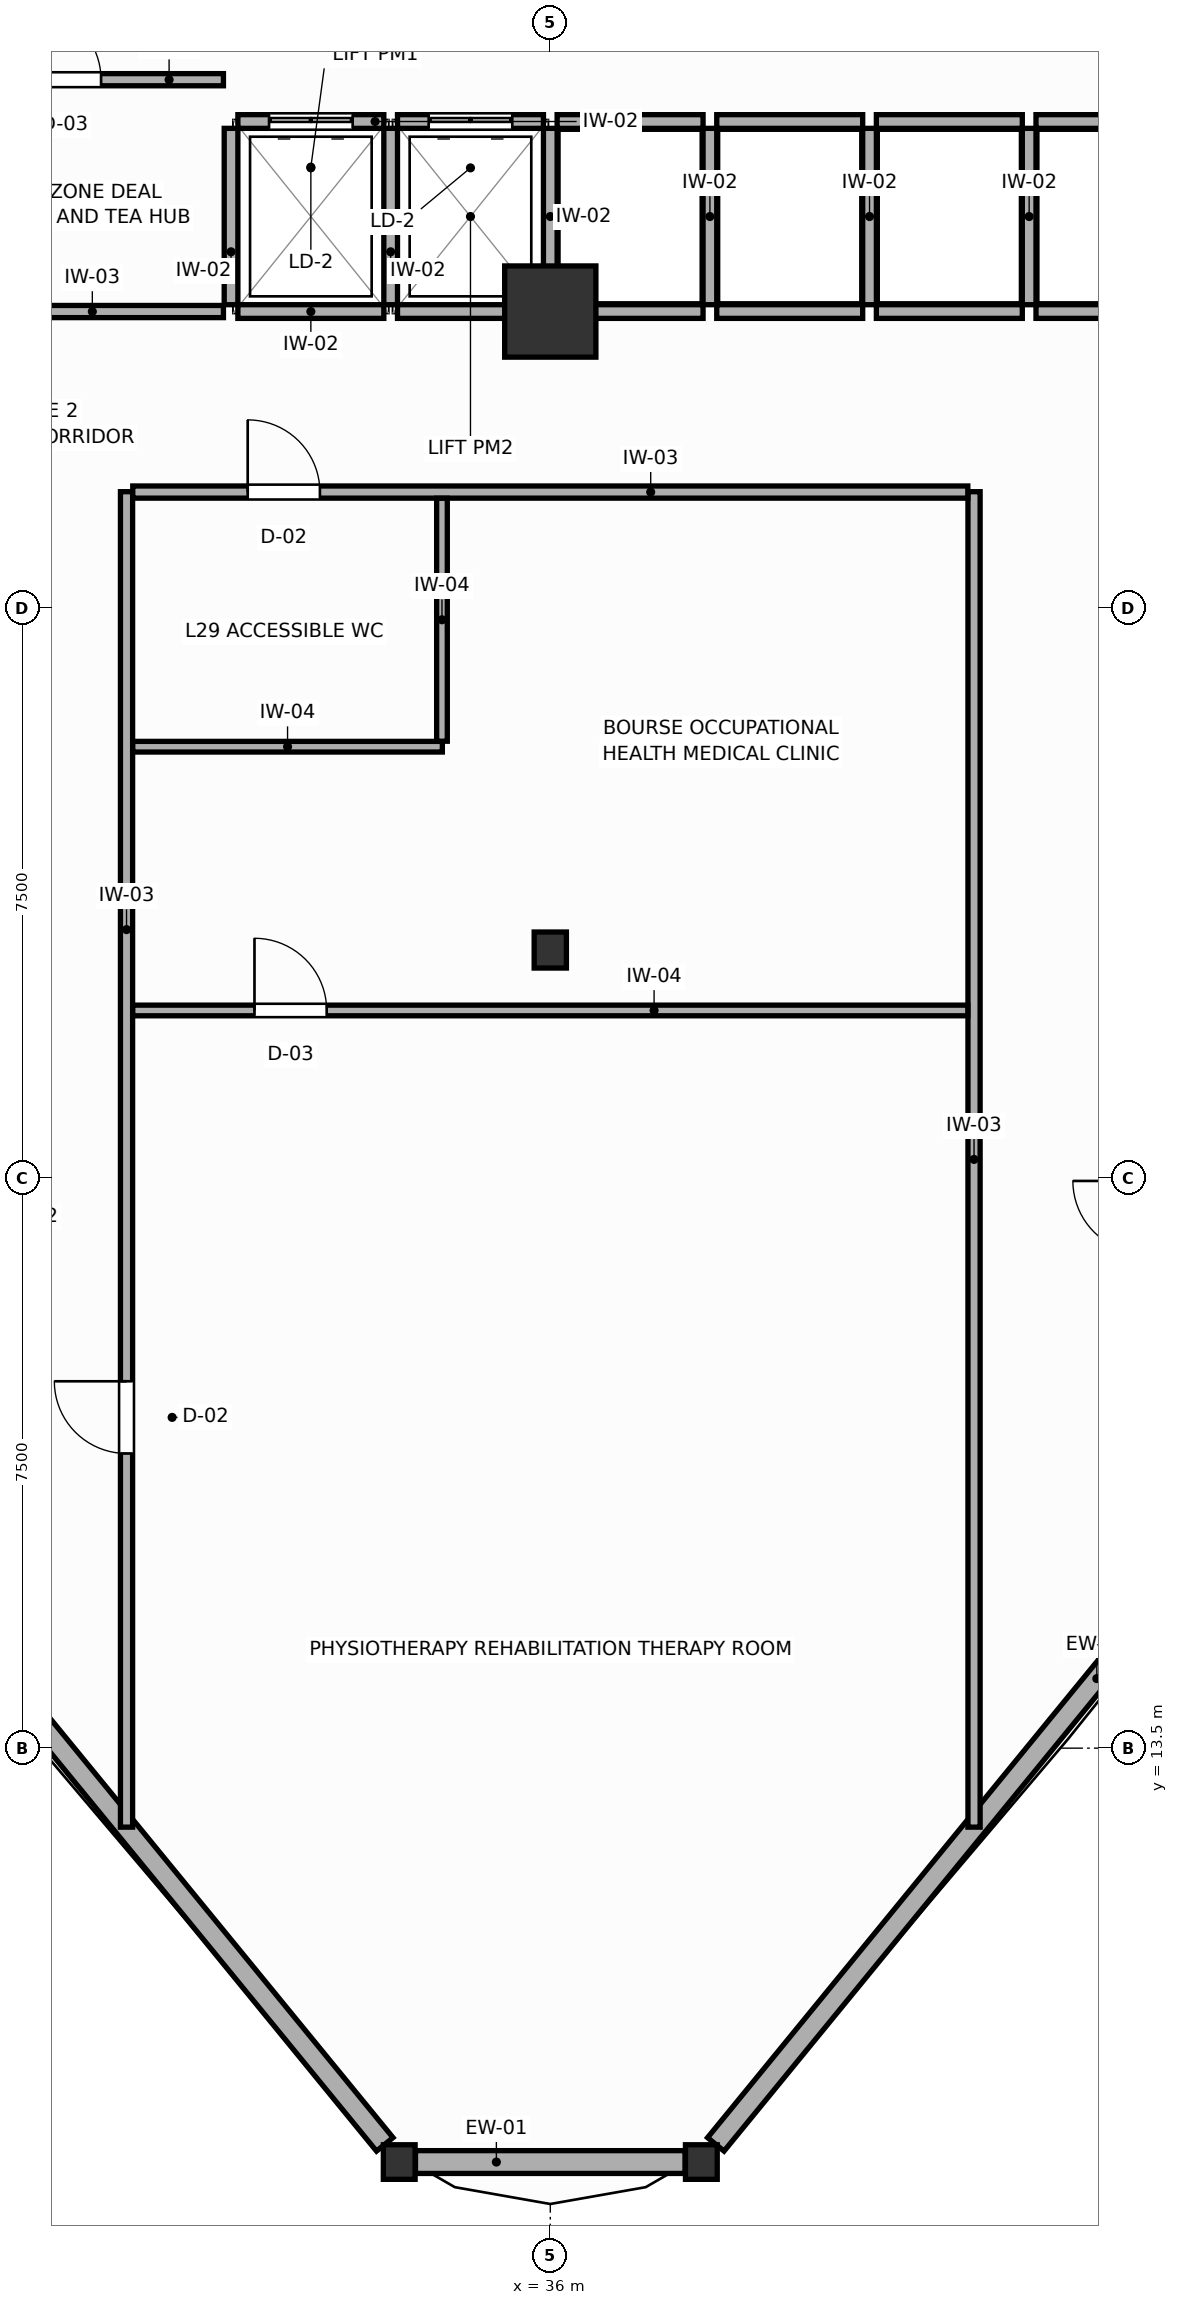
"""IFC4 building model, lengths in metres.
Left out: names, types, materials, properties, quantities, classifications, styles, units other than length and angle.
Written with IfcOpenShell. Run it as: python <this file> out.ifc"""

import sys

from ifc_helpers import new_model, si_unit, direction, frame, frame_2d, origin, origin_2d, place, context, subcontext, project, spatial, rectangle, i_section, extrude, source, transform, mapped, element, fill, save


model = new_model("IFC4")
c1 = context("Model", 3, precision=1e-05, world=origin(), true_north=direction((0.0, 1.0)))
c2 = subcontext(c1, "Body", "Model", "MODEL_VIEW")
j1 = project(units=[si_unit("LENGTHUNIT", "METRE"), si_unit("PLANEANGLEUNIT", "RADIAN")], contexts=[c1])
p1 = place(None, origin())
s1 = spatial("IfcSite", under=j1, at=p1, CompositionType="ELEMENT")
p2 = place(p1, origin())
s2 = spatial("IfcBuilding", under=s1, at=p2, CompositionType="ELEMENT")
p3 = place(p2, frame((0.0, 0.0, 117.0)))
s3 = spatial("IfcBuildingStorey", under=s2, at=p3, CompositionType="ELEMENT", Elevation=117.0)
m1 = source(origin(), c2, "Body", "SweptSolid", [
    extrude(rectangle(XDim=1.2, YDim=1.2, at=origin_2d()), origin(), (0.0, 0.0, 1.0), 3.6),
])
p4 = place(p3, frame((36.0, 32.4, 0.0), z_axis=(0.0, 0.0, 1.0), x_axis=(1.0, 0.0, 0.0)))
e1 = element("IfcColumn", 1, at=p4, inside=s3, PredefinedType="COLUMN", context=c2, shape_type="MappedRepresentation", body=[
    mapped(m1, transform((0.0, 0.0, 0.0), scale=1.0)),
])
m2 = source(origin(), c2, "Body", "SweptSolid", [
    extrude(i_section(OverallWidth=0.424, OverallDepth=0.474, WebThickness=0.045, FlangeThickness=0.072, FilletRadius=0.015, at=origin_2d()), origin(), (0.0, 0.0, 1.0), 3.6),
])
p5 = place(p3, frame((36.0, 24.0, 0.0), z_axis=(0.0, 0.0, 1.0), x_axis=(1.0, 0.0, 0.0)))
e2 = element("IfcColumn", 2, at=p5, inside=s3, PredefinedType="COLUMN", context=c2, shape_type="MappedRepresentation", body=[
    mapped(m2, transform((0.0, 0.0, 0.0), scale=1.0)),
])
m3 = source(origin(), c2, "Body", "SweptSolid", [
    extrude(i_section(OverallWidth=0.418, OverallDepth=0.455, WebThickness=0.039, FlangeThickness=0.063, FilletRadius=0.015, at=origin_2d()), origin(), (0.0, 0.0, 1.0), 3.6),
])
for number, where, z_axis, x_axis in (
    (3, (34.013, 8.055, 0.0), (0.0, 0.0, 1.0), (1.0, 0.0, 0.0)),
    (4, (37.987, 8.055, 0.0), (0.0, 0.0, 1.0), (1.0, 0.0, 0.0)),
):
    element("IfcColumn", number, at=place(p3, frame(where, z_axis=z_axis, x_axis=x_axis)), inside=s3, PredefinedType="COLUMN", context=c2, shape_type="MappedRepresentation", body=[
        mapped(m3, transform((0.0, 0.0, 0.0), scale=1.0)),
    ])
p6 = place(p3, frame((23.797, 20.543, 0.0), z_axis=(0.0, 0.0, 1.0), x_axis=(0.633140387555, -0.774036982092, 0.0)))
e5 = element("IfcWall", 5, at=p6, inside=s3, PredefinedType="SOLIDWALL", context=c2, shape_type="SweptSolid", body=[
    extrude(rectangle(XDim=15.834, YDim=0.28, at=frame_2d((7.917, 0.0))), origin(), (0.0, 0.0, 1.0), 1.87),
])
p7 = place(p3, frame((34.227, 8.055, 0.0), z_axis=(0.0, 0.0, 1.0), x_axis=(1.0, 0.0, 0.0)))
e6 = element("IfcWall", 6, at=p7, inside=s3, PredefinedType="SOLIDWALL", context=c2, shape_type="SweptSolid", body=[
    extrude(rectangle(XDim=3.547, YDim=0.3, at=frame_2d((1.773, 0.0))), origin(), (0.0, 0.0, 1.0), 1.87),
])
p8 = place(p3, frame((38.177, 8.287, 0.0), z_axis=(0.0, 0.0, 1.0), x_axis=(0.633140387555, 0.774036982092, 0.0)))
e7 = element("IfcWall", 7, at=p8, inside=s3, PredefinedType="SOLIDWALL", context=c2, shape_type="SweptSolid", body=[
    extrude(rectangle(XDim=15.834, YDim=0.28, at=frame_2d((7.917, 0.0))), origin(), (0.0, 0.0, 1.0), 1.87),
])
p9 = place(p3, frame((31.89, 34.9, 0.0), z_axis=(0.0, 0.0, 1.0), x_axis=(1.0, 0.0, 0.0)))
e8 = element("IfcWall", 8, at=p9, inside=s3, PredefinedType="PARTITIONING", context=c2, shape_type="SweptSolid", body=[
    extrude(rectangle(XDim=1.92, YDim=0.18, at=frame_2d((0.96, 0.0))), origin(), (0.0, 0.0, 1.0), 3.4),
])
p10 = place(p9, frame((0.41, 0.0, 0.0)))
e9 = element("IfcOpeningElement", 9, at=p10, cuts=e8, PredefinedType="OPENING", context=c2, shape_type="SweptSolid", body=[
    extrude(rectangle(XDim=1.1, YDim=2.1, at=frame_2d((0.55, 1.05))), frame((0.0, 0.1, 0.0), z_axis=(0.0, -1.0, 0.0), x_axis=(1.0, 0.0, 0.0)), (0.0, 0.0, 1.0), 0.2),
])
p11 = place(p3, frame((31.89, 32.4, 0.0), z_axis=(0.0, 0.0, 1.0), x_axis=(1.0, 0.0, 0.0)))
e10 = element("IfcWall", 10, at=p11, inside=s3, PredefinedType="PARTITIONING", context=c2, shape_type="SweptSolid", body=[
    extrude(rectangle(XDim=1.92, YDim=0.18, at=frame_2d((0.96, 0.0))), origin(), (0.0, 0.0, 1.0), 2.16),
])
p12 = place(p3, frame((31.8, 32.49, 0.0), z_axis=(0.0, 0.0, 1.0), x_axis=(0.0, 1.0, 0.0)))
e11 = element("IfcWall", 11, at=p12, inside=s3, PredefinedType="PARTITIONING", context=c2, shape_type="SweptSolid", body=[
    extrude(rectangle(XDim=2.32, YDim=0.18, at=frame_2d((1.16, 0.0))), origin(), (0.0, 0.0, 1.0), 3.4),
])
p13 = place(p3, frame((33.99, 34.9, 0.0), z_axis=(0.0, 0.0, 1.0), x_axis=(1.0, 0.0, 0.0)))
e12 = element("IfcWall", 12, at=p13, inside=s3, PredefinedType="PARTITIONING", context=c2, shape_type="SweptSolid", body=[
    extrude(rectangle(XDim=1.92, YDim=0.18, at=frame_2d((0.96, 0.0))), origin(), (0.0, 0.0, 1.0), 3.4),
])
p14 = place(p13, frame((0.41, 0.0, 0.0)))
e13 = element("IfcOpeningElement", 13, at=p14, cuts=e12, PredefinedType="OPENING", context=c2, shape_type="SweptSolid", body=[
    extrude(rectangle(XDim=1.1, YDim=2.1, at=frame_2d((0.55, 1.05))), frame((0.0, 0.1, 0.0), z_axis=(0.0, -1.0, 0.0), x_axis=(1.0, 0.0, 0.0)), (0.0, 0.0, 1.0), 0.2),
])
p15 = place(p3, frame((33.99, 32.4, 0.0), z_axis=(0.0, 0.0, 1.0), x_axis=(1.0, 0.0, 0.0)))
e14 = element("IfcWall", 14, at=p15, inside=s3, PredefinedType="PARTITIONING", context=c2, shape_type="SweptSolid", body=[
    extrude(rectangle(XDim=1.92, YDim=0.18, at=frame_2d((0.96, 0.0))), origin(), (0.0, 0.0, 1.0), 2.16),
])
p16 = place(p3, frame((33.9, 32.49, 0.0), z_axis=(0.0, 0.0, 1.0), x_axis=(0.0, 1.0, 0.0)))
e15 = element("IfcWall", 15, at=p16, inside=s3, PredefinedType="PARTITIONING", context=c2, shape_type="SweptSolid", body=[
    extrude(rectangle(XDim=2.32, YDim=0.18, at=frame_2d((1.16, 0.0))), origin(), (0.0, 0.0, 1.0), 3.4),
])
p17 = place(p3, frame((36.09, 34.9, 0.0), z_axis=(0.0, 0.0, 1.0), x_axis=(1.0, 0.0, 0.0)))
e16 = element("IfcWall", 16, at=p17, inside=s3, PredefinedType="PARTITIONING", context=c2, shape_type="SweptSolid", body=[
    extrude(rectangle(XDim=1.92, YDim=0.18, at=frame_2d((0.96, 0.0))), origin(), (0.0, 0.0, 1.0), 3.4),
])
p18 = place(p3, frame((36.09, 32.4, 0.0), z_axis=(0.0, 0.0, 1.0), x_axis=(1.0, 0.0, 0.0)))
e17 = element("IfcWall", 17, at=p18, inside=s3, PredefinedType="PARTITIONING", context=c2, shape_type="SweptSolid", body=[
    extrude(rectangle(XDim=1.92, YDim=0.18, at=frame_2d((0.96, 0.0))), origin(), (0.0, 0.0, 1.0), 2.16),
])
p19 = place(p3, frame((36.0, 32.49, 0.0), z_axis=(0.0, 0.0, 1.0), x_axis=(0.0, 1.0, 0.0)))
e18 = element("IfcWall", 18, at=p19, inside=s3, PredefinedType="PARTITIONING", context=c2, shape_type="SweptSolid", body=[
    extrude(rectangle(XDim=2.32, YDim=0.18, at=frame_2d((1.16, 0.0))), origin(), (0.0, 0.0, 1.0), 3.4),
])
p20 = place(p3, frame((38.19, 34.9, 0.0), z_axis=(0.0, 0.0, 1.0), x_axis=(1.0, 0.0, 0.0)))
e19 = element("IfcWall", 19, at=p20, inside=s3, PredefinedType="PARTITIONING", context=c2, shape_type="SweptSolid", body=[
    extrude(rectangle(XDim=1.92, YDim=0.18, at=frame_2d((0.96, 0.0))), origin(), (0.0, 0.0, 1.0), 3.4),
])
p21 = place(p3, frame((38.19, 32.4, 0.0), z_axis=(0.0, 0.0, 1.0), x_axis=(1.0, 0.0, 0.0)))
e20 = element("IfcWall", 20, at=p21, inside=s3, PredefinedType="PARTITIONING", context=c2, shape_type="SweptSolid", body=[
    extrude(rectangle(XDim=1.92, YDim=0.18, at=frame_2d((0.96, 0.0))), origin(), (0.0, 0.0, 1.0), 2.16),
])
p22 = place(p3, frame((38.1, 32.49, 0.0), z_axis=(0.0, 0.0, 1.0), x_axis=(0.0, 1.0, 0.0)))
e21 = element("IfcWall", 21, at=p22, inside=s3, PredefinedType="PARTITIONING", context=c2, shape_type="SweptSolid", body=[
    extrude(rectangle(XDim=2.32, YDim=0.18, at=frame_2d((1.16, 0.0))), origin(), (0.0, 0.0, 1.0), 3.4),
])
p23 = place(p3, frame((40.29, 34.9, 0.0), z_axis=(0.0, 0.0, 1.0), x_axis=(1.0, 0.0, 0.0)))
e22 = element("IfcWall", 22, at=p23, inside=s3, PredefinedType="PARTITIONING", context=c2, shape_type="SweptSolid", body=[
    extrude(rectangle(XDim=1.92, YDim=0.18, at=frame_2d((0.96, 0.0))), origin(), (0.0, 0.0, 1.0), 3.4),
])
p24 = place(p3, frame((40.29, 32.4, 0.0), z_axis=(0.0, 0.0, 1.0), x_axis=(1.0, 0.0, 0.0)))
e23 = element("IfcWall", 23, at=p24, inside=s3, PredefinedType="PARTITIONING", context=c2, shape_type="SweptSolid", body=[
    extrude(rectangle(XDim=1.92, YDim=0.18, at=frame_2d((0.96, 0.0))), origin(), (0.0, 0.0, 1.0), 2.16),
])
p25 = place(p3, frame((40.2, 32.49, 0.0), z_axis=(0.0, 0.0, 1.0), x_axis=(0.0, 1.0, 0.0)))
e24 = element("IfcWall", 24, at=p25, inside=s3, PredefinedType="PARTITIONING", context=c2, shape_type="SweptSolid", body=[
    extrude(rectangle(XDim=2.32, YDim=0.18, at=frame_2d((1.16, 0.0))), origin(), (0.0, 0.0, 1.0), 3.4),
])
p26 = place(p3, frame((42.39, 34.9, 0.0), z_axis=(0.0, 0.0, 1.0), x_axis=(1.0, 0.0, 0.0)))
e25 = element("IfcWall", 25, at=p26, inside=s3, PredefinedType="PARTITIONING", context=c2, shape_type="SweptSolid", body=[
    extrude(rectangle(XDim=1.92, YDim=0.18, at=frame_2d((0.96, 0.0))), origin(), (0.0, 0.0, 1.0), 3.4),
])
p27 = place(p3, frame((42.39, 32.4, 0.0), z_axis=(0.0, 0.0, 1.0), x_axis=(1.0, 0.0, 0.0)))
e26 = element("IfcWall", 26, at=p27, inside=s3, PredefinedType="PARTITIONING", context=c2, shape_type="SweptSolid", body=[
    extrude(rectangle(XDim=1.92, YDim=0.18, at=frame_2d((0.96, 0.0))), origin(), (0.0, 0.0, 1.0), 2.16),
])
p28 = place(p3, frame((42.3, 32.49, 0.0), z_axis=(0.0, 0.0, 1.0), x_axis=(0.0, 1.0, 0.0)))
e27 = element("IfcWall", 27, at=p28, inside=s3, PredefinedType="PARTITIONING", context=c2, shape_type="SweptSolid", body=[
    extrude(rectangle(XDim=2.32, YDim=0.18, at=frame_2d((1.16, 0.0))), origin(), (0.0, 0.0, 1.0), 3.4),
])
p29 = place(p3, frame((28.25, 32.4, 0.0), z_axis=(0.0, 0.0, 1.0), x_axis=(1.0, 0.0, 0.0)))
e28 = element("IfcWall", 28, at=p29, inside=s3, PredefinedType="PARTITIONING", context=c2, shape_type="SweptSolid", body=[
    extrude(rectangle(XDim=3.45, YDim=0.16, at=frame_2d((1.725, 0.0))), origin(), (0.0, 0.0, 1.0), 2.16),
])
p30 = place(p3, frame((27.69, 35.45, 0.0), z_axis=(0.0, 0.0, 1.0), x_axis=(1.0, 0.0, 0.0)))
e29 = element("IfcWall", 29, at=p30, inside=s3, PredefinedType="PARTITIONING", context=c2, shape_type="SweptSolid", body=[
    extrude(rectangle(XDim=4.01, YDim=0.16, at=frame_2d((2.005, 0.0))), origin(), (0.0, 0.0, 1.0), 3.4),
])
p31 = place(p30, frame((1.45, 0.0, 0.0)))
e30 = element("IfcOpeningElement", 30, at=p31, cuts=e29, PredefinedType="OPENING", context=c2, shape_type="SweptSolid", body=[
    extrude(rectangle(XDim=0.95, YDim=2.05, at=frame_2d((0.475, 1.025))), frame((0.0, 0.09, 0.0), z_axis=(0.0, -1.0, 0.0), x_axis=(1.0, 0.0, 0.0)), (0.0, 0.0, 1.0), 0.18),
])
p32 = place(p3, frame((30.425, 12.461, 0.0), z_axis=(0.0, 0.0, 1.0), x_axis=(0.0, 1.0, 0.0)))
e31 = element("IfcWall", 31, at=p32, inside=s3, PredefinedType="PARTITIONING", context=c2, shape_type="SweptSolid", body=[
    extrude(rectangle(XDim=17.569, YDim=0.16, at=frame_2d((8.785, 0.0))), origin(), (0.0, 0.0, 1.0), 3.4),
])
p33 = place(p32, frame((4.916, 0.0, 0.0)))
e32 = element("IfcOpeningElement", 32, at=p33, cuts=e31, PredefinedType="OPENING", context=c2, shape_type="SweptSolid", body=[
    extrude(rectangle(XDim=0.95, YDim=2.05, at=frame_2d((0.475, 1.025))), frame((0.0, 0.09, 0.0), z_axis=(0.0, -1.0, 0.0), x_axis=(1.0, 0.0, 0.0)), (0.0, 0.0, 1.0), 0.18),
])
p34 = place(p3, frame((41.575, 12.461, 0.0), z_axis=(0.0, 0.0, 1.0), x_axis=(0.0, 1.0, 0.0)))
e33 = element("IfcWall", 33, at=p34, inside=s3, PredefinedType="PARTITIONING", context=c2, shape_type="SweptSolid", body=[
    extrude(rectangle(XDim=17.569, YDim=0.16, at=frame_2d((8.785, 0.0))), origin(), (0.0, 0.0, 1.0), 3.4),
])
p35 = place(p3, frame((30.507, 30.025, 0.0), z_axis=(0.0, 0.0, 1.0), x_axis=(1.0, 0.0, 0.0)))
e34 = element("IfcWall", 34, at=p35, inside=s3, PredefinedType="PARTITIONING", context=c2, shape_type="SweptSolid", body=[
    extrude(rectangle(XDim=10.986, YDim=0.16, at=frame_2d((5.493, 0.0))), origin(), (0.0, 0.0, 1.0), 3.4),
])
p36 = place(p35, frame((1.512, 0.0, 0.0)))
e35 = element("IfcOpeningElement", 35, at=p36, cuts=e34, PredefinedType="OPENING", context=c2, shape_type="SweptSolid", body=[
    extrude(rectangle(XDim=0.95, YDim=2.05, at=frame_2d((0.475, 1.025))), frame((0.0, 0.09, 0.0), z_axis=(0.0, -1.0, 0.0), x_axis=(1.0, 0.0, 0.0)), (0.0, 0.0, 1.0), 0.18),
])
p37 = place(p3, frame((30.507, 23.205, 0.0), z_axis=(0.0, 0.0, 1.0), x_axis=(1.0, 0.0, 0.0)))
e36 = element("IfcWall", 36, at=p37, inside=s3, PredefinedType="PARTITIONING", context=c2, shape_type="SweptSolid", body=[
    extrude(rectangle(XDim=10.986, YDim=0.14, at=frame_2d((5.493, 0.0))), origin(), (0.0, 0.0, 1.0), 3.4),
])
p38 = place(p37, frame((1.601, 0.0, 0.0)))
e37 = element("IfcOpeningElement", 37, at=p38, cuts=e36, PredefinedType="OPENING", context=c2, shape_type="SweptSolid", body=[
    extrude(rectangle(XDim=0.95, YDim=2.05, at=frame_2d((0.475, 1.025))), frame((0.0, 0.08, 0.0), z_axis=(0.0, -1.0, 0.0), x_axis=(1.0, 0.0, 0.0)), (0.0, 0.0, 1.0), 0.16),
])
p39 = place(p3, frame((30.507, 26.675, 0.0), z_axis=(0.0, 0.0, 1.0), x_axis=(1.0, 0.0, 0.0)))
e38 = element("IfcWall", 38, at=p39, inside=s3, PredefinedType="PARTITIONING", context=c2, shape_type="SweptSolid", body=[
    extrude(rectangle(XDim=4.073, YDim=0.14, at=frame_2d((2.037, 0.0))), origin(), (0.0, 0.0, 1.0), 3.4),
])
p40 = place(p3, frame((34.575, 26.747, 0.0), z_axis=(0.0, 0.0, 1.0), x_axis=(0.0, 1.0, 0.0)))
e39 = element("IfcWall", 39, at=p40, inside=s3, PredefinedType="PARTITIONING", context=c2, shape_type="SweptSolid", body=[
    extrude(rectangle(XDim=3.196, YDim=0.14, at=frame_2d((1.598, 0.0))), origin(), (0.0, 0.0, 1.0), 3.4),
])
p41 = place(p10, origin())
e40 = element("IfcDoor", 40, at=p41, inside=s3, OperationType="DOUBLE_DOOR_SLIDING", PredefinedType="DOOR", context=c2, shape_type="SweptSolid", body=[
    extrude(rectangle(XDim=1.1, YDim=2.1, at=frame_2d((0.55, 1.05))), frame((0.0, 0.025, 0.0), z_axis=(0.0, -1.0, 0.0), x_axis=(1.0, 0.0, 0.0)), (0.0, 0.0, 1.0), 0.05),
])
fill(e9, e40)
p42 = place(p14, origin())
e41 = element("IfcDoor", 41, at=p42, inside=s3, OperationType="DOUBLE_DOOR_SLIDING", PredefinedType="DOOR", context=c2, shape_type="SweptSolid", body=[
    extrude(rectangle(XDim=1.1, YDim=2.1, at=frame_2d((0.55, 1.05))), frame((0.0, 0.025, 0.0), z_axis=(0.0, -1.0, 0.0), x_axis=(1.0, 0.0, 0.0)), (0.0, 0.0, 1.0), 0.05),
])
fill(e13, e41)
p43 = place(p31, origin())
e42 = element("IfcDoor", 42, at=p43, inside=s3, OperationType="SINGLE_SWING_LEFT", PredefinedType="DOOR", context=c2, shape_type="SweptSolid", body=[
    extrude(rectangle(XDim=0.95, YDim=2.05, at=frame_2d((0.475, 1.025))), frame((0.0, 0.025, 0.0), z_axis=(0.0, -1.0, 0.0), x_axis=(1.0, 0.0, 0.0)), (0.0, 0.0, 1.0), 0.05),
])
fill(e30, e42)
p44 = place(p33, origin())
e43 = element("IfcDoor", 43, at=p44, inside=s3, OperationType="SINGLE_SWING_RIGHT", PredefinedType="DOOR", context=c2, shape_type="SweptSolid", body=[
    extrude(rectangle(XDim=0.95, YDim=2.05, at=frame_2d((0.475, 1.025))), frame((0.0, 0.025, 0.0), z_axis=(0.0, -1.0, 0.0), x_axis=(1.0, 0.0, 0.0)), (0.0, 0.0, 1.0), 0.05),
])
fill(e32, e43)
p45 = place(p36, origin())
e44 = element("IfcDoor", 44, at=p45, inside=s3, OperationType="SINGLE_SWING_LEFT", PredefinedType="DOOR", context=c2, shape_type="SweptSolid", body=[
    extrude(rectangle(XDim=0.95, YDim=2.05, at=frame_2d((0.475, 1.025))), frame((0.0, 0.025, 0.0), z_axis=(0.0, -1.0, 0.0), x_axis=(1.0, 0.0, 0.0)), (0.0, 0.0, 1.0), 0.05),
])
fill(e35, e44)
p46 = place(p38, origin())
e45 = element("IfcDoor", 45, at=p46, inside=s3, OperationType="SINGLE_SWING_LEFT", PredefinedType="DOOR", context=c2, shape_type="SweptSolid", body=[
    extrude(rectangle(XDim=0.95, YDim=2.05, at=frame_2d((0.475, 1.025))), frame((0.0, 0.025, 0.0), z_axis=(0.0, -1.0, 0.0), x_axis=(1.0, 0.0, 0.0)), (0.0, 0.0, 1.0), 0.05),
])
fill(e37, e45)
save(model, sys.argv[1])
